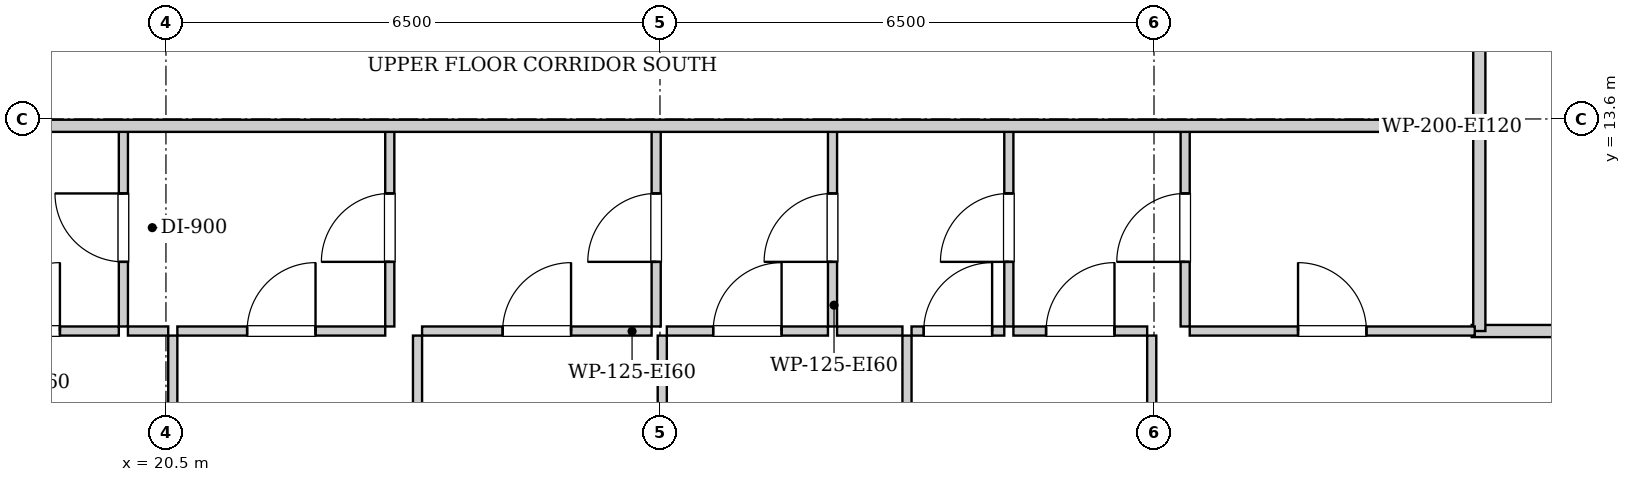
"""IFC4 building model, lengths in metres.
Left out: names, types, materials, properties, quantities, classifications, styles, units other than length and angle.
Written with IfcOpenShell. Run it as: python <this file> out.ifc"""

import sys

from ifc_helpers import new_model, si_unit, direction, frame, frame_2d, origin, place, context, subcontext, project, spatial, rectangle, extrude, element, fill, save


model = new_model("IFC4")
c1 = context("Model", 3, precision=1e-05, world=origin(), true_north=direction((0.0, 1.0)))
c2 = subcontext(c1, "Body", "Model", "MODEL_VIEW")
j1 = project(units=[si_unit("LENGTHUNIT", "METRE"), si_unit("PLANEANGLEUNIT", "RADIAN")], contexts=[c1])
p1 = place(None, origin())
s1 = spatial("IfcSite", under=j1, at=p1, CompositionType="ELEMENT")
p2 = place(p1, origin())
s2 = spatial("IfcBuilding", under=s1, at=p2, CompositionType="ELEMENT")
p3 = place(p2, frame((0.0, 0.0, 184.3)))
s3 = spatial("IfcBuildingStorey", under=s2, at=p3, CompositionType="ELEMENT", Elevation=184.3)
p4 = place(p3, frame((37.78, 13.51, 0.0), z_axis=(0.0, 0.0, 1.0), x_axis=(0.0, 1.0, 0.0)))
e1 = element("IfcWall", 1, at=p4, inside=s3, PredefinedType="PARTITIONING", context=c2, shape_type="SweptSolid", body=[
    extrude(rectangle(XDim=1.58, YDim=0.16, at=frame_2d((0.79, 0.0))), origin(), (0.0, 0.0, 1.0), 3.04),
])
p5 = place(p3, frame((37.68, 10.81, 0.0), z_axis=(0.0, 0.0, 1.0), x_axis=(1.0, 0.0, 0.0)))
e2 = element("IfcWall", 2, at=p5, inside=s3, PredefinedType="PARTITIONING", context=c2, shape_type="SweptSolid", body=[
    extrude(rectangle(XDim=2.34, YDim=0.16, at=frame_2d((1.17, 0.0))), origin(), (0.0, 0.0, 1.0), 3.04),
])
p6 = place(p3, frame((37.78, 10.81, 0.0), z_axis=(0.0, 0.0, 1.0), x_axis=(0.0, 1.0, 0.0)))
e3 = element("IfcWall", 3, at=p6, inside=s3, PredefinedType="PARTITIONING", context=c2, shape_type="SweptSolid", body=[
    extrude(rectangle(XDim=2.66, YDim=0.16, at=frame_2d((1.33, 0.0))), origin(), (0.0, 0.0, 1.0), 3.04),
])
p7 = place(p3, frame((19.94, 10.87, 0.0), z_axis=(0.0, 0.0, 1.0), x_axis=(0.0, 1.0, 0.0)))
e4 = element("IfcWall", 4, at=p7, inside=s3, PredefinedType="PARTITIONING", context=c2, shape_type="SweptSolid", body=[
    extrude(rectangle(XDim=2.6, YDim=0.12, at=frame_2d((1.3, 0.0))), origin(), (0.0, 0.0, 1.0), 3.04),
])
p8 = place(p7, frame((0.85, 0.0, 0.0)))
e5 = element("IfcOpeningElement", 5, at=p8, cuts=e4, PredefinedType="OPENING", context=c2, shape_type="SweptSolid", body=[
    extrude(rectangle(XDim=0.9, YDim=2.05, at=frame_2d((0.45, 1.025))), frame((0.0, 0.07, 0.0), z_axis=(0.0, -1.0, 0.0), x_axis=(1.0, 0.0, 0.0)), (0.0, 0.0, 1.0), 0.14),
])
p9 = place(p3, frame((17.43, 10.81, 0.0), z_axis=(0.0, 0.0, 1.0), x_axis=(1.0, 0.0, 0.0)))
e6 = element("IfcWall", 6, at=p9, inside=s3, PredefinedType="PARTITIONING", context=c2, shape_type="SweptSolid", body=[
    extrude(rectangle(XDim=2.45, YDim=0.12, at=frame_2d((1.225, 0.0))), origin(), (0.0, 0.0, 1.0), 3.04),
])
p10 = place(p9, frame((0.775, 0.0, 0.0)))
e7 = element("IfcOpeningElement", 7, at=p10, cuts=e6, PredefinedType="OPENING", context=c2, shape_type="SweptSolid", body=[
    extrude(rectangle(XDim=0.9, YDim=2.05, at=frame_2d((0.45, 1.025))), frame((0.0, 0.07, 0.0), z_axis=(0.0, -1.0, 0.0), x_axis=(1.0, 0.0, 0.0)), (0.0, 0.0, 1.0), 0.14),
])
p11 = place(p3, frame((23.445, 10.87, 0.0), z_axis=(0.0, 0.0, 1.0), x_axis=(0.0, 1.0, 0.0)))
e8 = element("IfcWall", 8, at=p11, inside=s3, PredefinedType="PARTITIONING", context=c2, shape_type="SweptSolid", body=[
    extrude(rectangle(XDim=2.6, YDim=0.12, at=frame_2d((1.3, 0.0))), origin(), (0.0, 0.0, 1.0), 3.04),
])
p12 = place(p11, frame((0.85, 0.0, 0.0)))
e9 = element("IfcOpeningElement", 9, at=p12, cuts=e8, PredefinedType="OPENING", context=c2, shape_type="SweptSolid", body=[
    extrude(rectangle(XDim=0.9, YDim=2.05, at=frame_2d((0.45, 1.025))), frame((0.0, 0.07, 0.0), z_axis=(0.0, -1.0, 0.0), x_axis=(1.0, 0.0, 0.0)), (0.0, 0.0, 1.0), 0.14),
])
p13 = place(p3, frame((20.0, 10.81, 0.0), z_axis=(0.0, 0.0, 1.0), x_axis=(1.0, 0.0, 0.0)))
e10 = element("IfcWall", 10, at=p13, inside=s3, PredefinedType="PARTITIONING", context=c2, shape_type="SweptSolid", body=[
    extrude(rectangle(XDim=0.53, YDim=0.12, at=frame_2d((0.265, 0.0))), origin(), (0.0, 0.0, 1.0), 3.04),
])
p14 = place(p3, frame((20.65, 10.81, 0.0), z_axis=(0.0, 0.0, 1.0), x_axis=(1.0, 0.0, 0.0)))
e11 = element("IfcWall", 11, at=p14, inside=s3, PredefinedType="PARTITIONING", context=c2, shape_type="SweptSolid", body=[
    extrude(rectangle(XDim=2.735, YDim=0.12, at=frame_2d((1.368, 0.0))), origin(), (0.0, 0.0, 1.0), 3.04),
])
p15 = place(p14, frame((0.918, 0.0, 0.0)))
e12 = element("IfcOpeningElement", 12, at=p15, cuts=e11, PredefinedType="OPENING", context=c2, shape_type="SweptSolid", body=[
    extrude(rectangle(XDim=0.9, YDim=2.05, at=frame_2d((0.45, 1.025))), frame((0.0, 0.07, 0.0), z_axis=(0.0, -1.0, 0.0), x_axis=(1.0, 0.0, 0.0)), (0.0, 0.0, 1.0), 0.14),
])
p16 = place(p3, frame((26.95, 10.87, 0.0), z_axis=(0.0, 0.0, 1.0), x_axis=(0.0, 1.0, 0.0)))
e13 = element("IfcWall", 13, at=p16, inside=s3, PredefinedType="PARTITIONING", context=c2, shape_type="SweptSolid", body=[
    extrude(rectangle(XDim=2.6, YDim=0.12, at=frame_2d((1.3, 0.0))), origin(), (0.0, 0.0, 1.0), 3.04),
])
p17 = place(p16, frame((0.85, 0.0, 0.0)))
e14 = element("IfcOpeningElement", 14, at=p17, cuts=e13, PredefinedType="OPENING", context=c2, shape_type="SweptSolid", body=[
    extrude(rectangle(XDim=0.9, YDim=2.05, at=frame_2d((0.45, 1.025))), frame((0.0, 0.07, 0.0), z_axis=(0.0, -1.0, 0.0), x_axis=(1.0, 0.0, 0.0)), (0.0, 0.0, 1.0), 0.14),
])
p18 = place(p3, frame((23.87, 10.81, 0.0), z_axis=(0.0, 0.0, 1.0), x_axis=(1.0, 0.0, 0.0)))
e15 = element("IfcWall", 15, at=p18, inside=s3, PredefinedType="PARTITIONING", context=c2, shape_type="SweptSolid", body=[
    extrude(rectangle(XDim=3.02, YDim=0.12, at=frame_2d((1.51, 0.0))), origin(), (0.0, 0.0, 1.0), 3.04),
])
p19 = place(p18, frame((1.06, 0.0, 0.0)))
e16 = element("IfcOpeningElement", 16, at=p19, cuts=e15, PredefinedType="OPENING", context=c2, shape_type="SweptSolid", body=[
    extrude(rectangle(XDim=0.9, YDim=2.05, at=frame_2d((0.45, 1.025))), frame((0.0, 0.07, 0.0), z_axis=(0.0, -1.0, 0.0), x_axis=(1.0, 0.0, 0.0)), (0.0, 0.0, 1.0), 0.14),
])
p20 = place(p3, frame((29.27, 10.87, 0.0), z_axis=(0.0, 0.0, 1.0), x_axis=(0.0, 1.0, 0.0)))
e17 = element("IfcWall", 17, at=p20, inside=s3, PredefinedType="PARTITIONING", context=c2, shape_type="SweptSolid", body=[
    extrude(rectangle(XDim=2.6, YDim=0.12, at=frame_2d((1.3, 0.0))), origin(), (0.0, 0.0, 1.0), 3.04),
])
p21 = place(p20, frame((0.85, 0.0, 0.0)))
e18 = element("IfcOpeningElement", 18, at=p21, cuts=e17, PredefinedType="OPENING", context=c2, shape_type="SweptSolid", body=[
    extrude(rectangle(XDim=0.9, YDim=2.05, at=frame_2d((0.45, 1.025))), frame((0.0, 0.07, 0.0), z_axis=(0.0, -1.0, 0.0), x_axis=(1.0, 0.0, 0.0)), (0.0, 0.0, 1.0), 0.14),
])
p22 = place(p3, frame((27.09, 10.81, 0.0), z_axis=(0.0, 0.0, 1.0), x_axis=(1.0, 0.0, 0.0)))
e19 = element("IfcWall", 19, at=p22, inside=s3, PredefinedType="PARTITIONING", context=c2, shape_type="SweptSolid", body=[
    extrude(rectangle(XDim=2.12, YDim=0.12, at=frame_2d((1.06, 0.0))), origin(), (0.0, 0.0, 1.0), 3.04),
])
p23 = place(p22, frame((0.61, 0.0, 0.0)))
e20 = element("IfcOpeningElement", 20, at=p23, cuts=e19, PredefinedType="OPENING", context=c2, shape_type="SweptSolid", body=[
    extrude(rectangle(XDim=0.9, YDim=2.05, at=frame_2d((0.45, 1.025))), frame((0.0, 0.07, 0.0), z_axis=(0.0, -1.0, 0.0), x_axis=(1.0, 0.0, 0.0)), (0.0, 0.0, 1.0), 0.14),
])
p24 = place(p3, frame((31.59, 10.87, 0.0), z_axis=(0.0, 0.0, 1.0), x_axis=(0.0, 1.0, 0.0)))
e21 = element("IfcWall", 21, at=p24, inside=s3, PredefinedType="PARTITIONING", context=c2, shape_type="SweptSolid", body=[
    extrude(rectangle(XDim=2.6, YDim=0.12, at=frame_2d((1.3, 0.0))), origin(), (0.0, 0.0, 1.0), 3.04),
])
p25 = place(p24, frame((0.85, 0.0, 0.0)))
e22 = element("IfcOpeningElement", 22, at=p25, cuts=e21, PredefinedType="OPENING", context=c2, shape_type="SweptSolid", body=[
    extrude(rectangle(XDim=0.9, YDim=2.05, at=frame_2d((0.45, 1.025))), frame((0.0, 0.07, 0.0), z_axis=(0.0, -1.0, 0.0), x_axis=(1.0, 0.0, 0.0)), (0.0, 0.0, 1.0), 0.14),
])
p26 = place(p3, frame((29.33, 10.81, 0.0), z_axis=(0.0, 0.0, 1.0), x_axis=(1.0, 0.0, 0.0)))
e23 = element("IfcWall", 23, at=p26, inside=s3, PredefinedType="PARTITIONING", context=c2, shape_type="SweptSolid", body=[
    extrude(rectangle(XDim=0.86, YDim=0.12, at=frame_2d((0.43, 0.0))), origin(), (0.0, 0.0, 1.0), 3.04),
])
p27 = place(p3, frame((30.31, 10.81, 0.0), z_axis=(0.0, 0.0, 1.0), x_axis=(1.0, 0.0, 0.0)))
e24 = element("IfcWall", 24, at=p27, inside=s3, PredefinedType="PARTITIONING", context=c2, shape_type="SweptSolid", body=[
    extrude(rectangle(XDim=1.22, YDim=0.12, at=frame_2d((0.61, 0.0))), origin(), (0.0, 0.0, 1.0), 3.04),
])
p28 = place(p27, frame((0.16, 0.0, 0.0)))
e25 = element("IfcOpeningElement", 25, at=p28, cuts=e24, PredefinedType="OPENING", context=c2, shape_type="SweptSolid", body=[
    extrude(rectangle(XDim=0.9, YDim=2.05, at=frame_2d((0.45, 1.025))), frame((0.0, 0.07, 0.0), z_axis=(0.0, -1.0, 0.0), x_axis=(1.0, 0.0, 0.0)), (0.0, 0.0, 1.0), 0.14),
])
p29 = place(p3, frame((33.91, 10.87, 0.0), z_axis=(0.0, 0.0, 1.0), x_axis=(0.0, 1.0, 0.0)))
e26 = element("IfcWall", 26, at=p29, inside=s3, PredefinedType="PARTITIONING", context=c2, shape_type="SweptSolid", body=[
    extrude(rectangle(XDim=2.6, YDim=0.12, at=frame_2d((1.3, 0.0))), origin(), (0.0, 0.0, 1.0), 3.04),
])
p30 = place(p29, frame((0.85, 0.0, 0.0)))
e27 = element("IfcOpeningElement", 27, at=p30, cuts=e26, PredefinedType="OPENING", context=c2, shape_type="SweptSolid", body=[
    extrude(rectangle(XDim=0.9, YDim=2.05, at=frame_2d((0.45, 1.025))), frame((0.0, 0.07, 0.0), z_axis=(0.0, -1.0, 0.0), x_axis=(1.0, 0.0, 0.0)), (0.0, 0.0, 1.0), 0.14),
])
p31 = place(p3, frame((31.65, 10.81, 0.0), z_axis=(0.0, 0.0, 1.0), x_axis=(1.0, 0.0, 0.0)))
e28 = element("IfcWall", 28, at=p31, inside=s3, PredefinedType="PARTITIONING", context=c2, shape_type="SweptSolid", body=[
    extrude(rectangle(XDim=1.76, YDim=0.12, at=frame_2d((0.88, 0.0))), origin(), (0.0, 0.0, 1.0), 3.04),
])
p32 = place(p31, frame((0.43, 0.0, 0.0)))
e29 = element("IfcOpeningElement", 29, at=p32, cuts=e28, PredefinedType="OPENING", context=c2, shape_type="SweptSolid", body=[
    extrude(rectangle(XDim=0.9, YDim=2.05, at=frame_2d((0.45, 1.025))), frame((0.0, 0.07, 0.0), z_axis=(0.0, -1.0, 0.0), x_axis=(1.0, 0.0, 0.0)), (0.0, 0.0, 1.0), 0.14),
])
p33 = place(p3, frame((33.97, 10.81, 0.0), z_axis=(0.0, 0.0, 1.0), x_axis=(1.0, 0.0, 0.0)))
e30 = element("IfcWall", 30, at=p33, inside=s3, PredefinedType="PARTITIONING", context=c2, shape_type="SweptSolid", body=[
    extrude(rectangle(XDim=3.75, YDim=0.12, at=frame_2d((1.875, 0.0))), origin(), (0.0, 0.0, 1.0), 3.04),
])
p34 = place(p33, frame((1.425, 0.0, 0.0)))
e31 = element("IfcOpeningElement", 31, at=p34, cuts=e30, PredefinedType="OPENING", context=c2, shape_type="SweptSolid", body=[
    extrude(rectangle(XDim=0.9, YDim=2.05, at=frame_2d((0.45, 1.025))), frame((0.0, 0.07, 0.0), z_axis=(0.0, -1.0, 0.0), x_axis=(1.0, 0.0, 0.0)), (0.0, 0.0, 1.0), 0.14),
])
p35 = place(p3, frame((20.59, 4.08, 0.0), z_axis=(0.0, 0.0, 1.0), x_axis=(0.0, 1.0, 0.0)))
e32 = element("IfcWall", 32, at=p35, inside=s3, PredefinedType="PARTITIONING", context=c2, shape_type="SweptSolid", body=[
    extrude(rectangle(XDim=6.67, YDim=0.12, at=frame_2d((3.335, 0.0))), origin(), (0.0, 0.0, 1.0), 3.04),
])
p36 = place(p35, frame((2.87, 0.0, 0.0)))
e33 = element("IfcOpeningElement", 33, at=p36, cuts=e32, PredefinedType="OPENING", context=c2, shape_type="SweptSolid", body=[
    extrude(rectangle(XDim=0.9, YDim=2.05, at=frame_2d((0.45, 1.025))), frame((0.0, 0.07, 0.0), z_axis=(0.0, -1.0, 0.0), x_axis=(1.0, 0.0, 0.0)), (0.0, 0.0, 1.0), 0.14),
])
p37 = place(p3, frame((23.81, 4.08, 0.0), z_axis=(0.0, 0.0, 1.0), x_axis=(0.0, 1.0, 0.0)))
e34 = element("IfcWall", 34, at=p37, inside=s3, PredefinedType="PARTITIONING", context=c2, shape_type="SweptSolid", body=[
    extrude(rectangle(XDim=6.67, YDim=0.12, at=frame_2d((3.335, 0.0))), origin(), (0.0, 0.0, 1.0), 3.04),
])
p38 = place(p37, frame((2.87, 0.0, 0.0)))
e35 = element("IfcOpeningElement", 35, at=p38, cuts=e34, PredefinedType="OPENING", context=c2, shape_type="SweptSolid", body=[
    extrude(rectangle(XDim=0.9, YDim=2.05, at=frame_2d((0.45, 1.025))), frame((0.0, 0.07, 0.0), z_axis=(0.0, -1.0, 0.0), x_axis=(1.0, 0.0, 0.0)), (0.0, 0.0, 1.0), 0.14),
])
p39 = place(p3, frame((27.03, 4.08, 0.0), z_axis=(0.0, 0.0, 1.0), x_axis=(0.0, 1.0, 0.0)))
e36 = element("IfcWall", 36, at=p39, inside=s3, PredefinedType="PARTITIONING", context=c2, shape_type="SweptSolid", body=[
    extrude(rectangle(XDim=6.67, YDim=0.12, at=frame_2d((3.335, 0.0))), origin(), (0.0, 0.0, 1.0), 3.04),
])
p40 = place(p39, frame((2.87, 0.0, 0.0)))
e37 = element("IfcOpeningElement", 37, at=p40, cuts=e36, PredefinedType="OPENING", context=c2, shape_type="SweptSolid", body=[
    extrude(rectangle(XDim=0.9, YDim=2.05, at=frame_2d((0.45, 1.025))), frame((0.0, 0.07, 0.0), z_axis=(0.0, -1.0, 0.0), x_axis=(1.0, 0.0, 0.0)), (0.0, 0.0, 1.0), 0.14),
])
p41 = place(p3, frame((30.25, 4.08, 0.0), z_axis=(0.0, 0.0, 1.0), x_axis=(0.0, 1.0, 0.0)))
e38 = element("IfcWall", 38, at=p41, inside=s3, PredefinedType="PARTITIONING", context=c2, shape_type="SweptSolid", body=[
    extrude(rectangle(XDim=6.67, YDim=0.12, at=frame_2d((3.335, 0.0))), origin(), (0.0, 0.0, 1.0), 3.04),
])
p42 = place(p41, frame((2.87, 0.0, 0.0)))
e39 = element("IfcOpeningElement", 39, at=p42, cuts=e38, PredefinedType="OPENING", context=c2, shape_type="SweptSolid", body=[
    extrude(rectangle(XDim=0.9, YDim=2.05, at=frame_2d((0.45, 1.025))), frame((0.0, 0.07, 0.0), z_axis=(0.0, -1.0, 0.0), x_axis=(1.0, 0.0, 0.0)), (0.0, 0.0, 1.0), 0.14),
])
p43 = place(p3, frame((33.47, 6.23, 0.0), z_axis=(0.0, 0.0, 1.0), x_axis=(0.0, 1.0, 0.0)))
e40 = element("IfcWall", 40, at=p43, inside=s3, PredefinedType="PARTITIONING", context=c2, shape_type="SweptSolid", body=[
    extrude(rectangle(XDim=4.52, YDim=0.12, at=frame_2d((2.26, 0.0))), origin(), (0.0, 0.0, 1.0), 3.04),
])
p44 = place(p43, frame((1.81, 0.0, 0.0)))
e41 = element("IfcOpeningElement", 41, at=p44, cuts=e40, PredefinedType="OPENING", context=c2, shape_type="SweptSolid", body=[
    extrude(rectangle(XDim=0.9, YDim=2.05, at=frame_2d((0.45, 1.025))), frame((0.0, 0.07, 0.0), z_axis=(0.0, -1.0, 0.0), x_axis=(1.0, 0.0, 0.0)), (0.0, 0.0, 1.0), 0.14),
])
p45 = place(p3, frame((13.15, 13.51, 0.0), z_axis=(0.0, 0.0, 1.0), x_axis=(1.0, 0.0, 0.0)))
e42 = element("IfcWall", 42, at=p45, inside=s3, PredefinedType="PARTITIONING", context=c2, shape_type="SweptSolid", body=[
    extrude(rectangle(XDim=24.6, YDim=0.16, at=frame_2d((12.3, 0.0))), origin(), (0.0, 0.0, 1.0), 3.04),
])
p46 = place(p45, frame((3.115, 0.0, 0.0)))
e43 = element("IfcOpeningElement", 43, at=p46, cuts=e42, PredefinedType="OPENING", context=c2, shape_type="SweptSolid", body=[
    extrude(rectangle(XDim=0.95, YDim=2.1, at=frame_2d((0.475, 1.05))), frame((0.0, 0.09, 0.0), z_axis=(0.0, -1.0, 0.0), x_axis=(1.0, 0.0, 0.0)), (0.0, 0.0, 1.0), 0.18),
])
p47 = place(p8, origin())
e44 = element("IfcDoor", 44, at=p47, inside=s3, OperationType="SINGLE_SWING_RIGHT", PredefinedType="DOOR", context=c2, shape_type="SweptSolid", body=[
    extrude(rectangle(XDim=0.9, YDim=2.05, at=frame_2d((0.45, 1.025))), frame((0.0, 0.025, 0.0), z_axis=(0.0, -1.0, 0.0), x_axis=(1.0, 0.0, 0.0)), (0.0, 0.0, 1.0), 0.05),
])
fill(e5, e44)
p48 = place(p10, origin())
e45 = element("IfcDoor", 45, at=p48, inside=s3, OperationType="SINGLE_SWING_RIGHT", PredefinedType="DOOR", context=c2, shape_type="SweptSolid", body=[
    extrude(rectangle(XDim=0.9, YDim=2.05, at=frame_2d((0.45, 1.025))), frame((0.0, 0.025, 0.0), z_axis=(0.0, -1.0, 0.0), x_axis=(1.0, 0.0, 0.0)), (0.0, 0.0, 1.0), 0.05),
])
fill(e7, e45)
p49 = place(p12, origin())
e46 = element("IfcDoor", 46, at=p49, inside=s3, OperationType="SINGLE_SWING_LEFT", PredefinedType="DOOR", context=c2, shape_type="SweptSolid", body=[
    extrude(rectangle(XDim=0.9, YDim=2.05, at=frame_2d((0.45, 1.025))), frame((0.0, 0.025, 0.0), z_axis=(0.0, -1.0, 0.0), x_axis=(1.0, 0.0, 0.0)), (0.0, 0.0, 1.0), 0.05),
])
fill(e9, e46)
p50 = place(p15, origin())
e47 = element("IfcDoor", 47, at=p50, inside=s3, OperationType="SINGLE_SWING_RIGHT", PredefinedType="DOOR", context=c2, shape_type="SweptSolid", body=[
    extrude(rectangle(XDim=0.9, YDim=2.05, at=frame_2d((0.45, 1.025))), frame((0.0, 0.025, 0.0), z_axis=(0.0, -1.0, 0.0), x_axis=(1.0, 0.0, 0.0)), (0.0, 0.0, 1.0), 0.05),
])
fill(e12, e47)
p51 = place(p17, origin())
e48 = element("IfcDoor", 48, at=p51, inside=s3, OperationType="SINGLE_SWING_LEFT", PredefinedType="DOOR", context=c2, shape_type="SweptSolid", body=[
    extrude(rectangle(XDim=0.9, YDim=2.05, at=frame_2d((0.45, 1.025))), frame((0.0, 0.025, 0.0), z_axis=(0.0, -1.0, 0.0), x_axis=(1.0, 0.0, 0.0)), (0.0, 0.0, 1.0), 0.05),
])
fill(e14, e48)
p52 = place(p19, origin())
e49 = element("IfcDoor", 49, at=p52, inside=s3, OperationType="SINGLE_SWING_RIGHT", PredefinedType="DOOR", context=c2, shape_type="SweptSolid", body=[
    extrude(rectangle(XDim=0.9, YDim=2.05, at=frame_2d((0.45, 1.025))), frame((0.0, 0.025, 0.0), z_axis=(0.0, -1.0, 0.0), x_axis=(1.0, 0.0, 0.0)), (0.0, 0.0, 1.0), 0.05),
])
fill(e16, e49)
p53 = place(p21, origin())
e50 = element("IfcDoor", 50, at=p53, inside=s3, OperationType="SINGLE_SWING_LEFT", PredefinedType="DOOR", context=c2, shape_type="SweptSolid", body=[
    extrude(rectangle(XDim=0.9, YDim=2.05, at=frame_2d((0.45, 1.025))), frame((0.0, 0.025, 0.0), z_axis=(0.0, -1.0, 0.0), x_axis=(1.0, 0.0, 0.0)), (0.0, 0.0, 1.0), 0.05),
])
fill(e18, e50)
p54 = place(p23, origin())
e51 = element("IfcDoor", 51, at=p54, inside=s3, OperationType="SINGLE_SWING_RIGHT", PredefinedType="DOOR", context=c2, shape_type="SweptSolid", body=[
    extrude(rectangle(XDim=0.9, YDim=2.05, at=frame_2d((0.45, 1.025))), frame((0.0, 0.025, 0.0), z_axis=(0.0, -1.0, 0.0), x_axis=(1.0, 0.0, 0.0)), (0.0, 0.0, 1.0), 0.05),
])
fill(e20, e51)
p55 = place(p25, origin())
e52 = element("IfcDoor", 52, at=p55, inside=s3, OperationType="SINGLE_SWING_LEFT", PredefinedType="DOOR", context=c2, shape_type="SweptSolid", body=[
    extrude(rectangle(XDim=0.9, YDim=2.05, at=frame_2d((0.45, 1.025))), frame((0.0, 0.025, 0.0), z_axis=(0.0, -1.0, 0.0), x_axis=(1.0, 0.0, 0.0)), (0.0, 0.0, 1.0), 0.05),
])
fill(e22, e52)
p56 = place(p28, origin())
e53 = element("IfcDoor", 53, at=p56, inside=s3, OperationType="SINGLE_SWING_RIGHT", PredefinedType="DOOR", context=c2, shape_type="SweptSolid", body=[
    extrude(rectangle(XDim=0.9, YDim=2.05, at=frame_2d((0.45, 1.025))), frame((0.0, 0.025, 0.0), z_axis=(0.0, -1.0, 0.0), x_axis=(1.0, 0.0, 0.0)), (0.0, 0.0, 1.0), 0.05),
])
fill(e25, e53)
p57 = place(p30, origin())
e54 = element("IfcDoor", 54, at=p57, inside=s3, OperationType="SINGLE_SWING_LEFT", PredefinedType="DOOR", context=c2, shape_type="SweptSolid", body=[
    extrude(rectangle(XDim=0.9, YDim=2.05, at=frame_2d((0.45, 1.025))), frame((0.0, 0.025, 0.0), z_axis=(0.0, -1.0, 0.0), x_axis=(1.0, 0.0, 0.0)), (0.0, 0.0, 1.0), 0.05),
])
fill(e27, e54)
p58 = place(p32, origin())
e55 = element("IfcDoor", 55, at=p58, inside=s3, OperationType="SINGLE_SWING_RIGHT", PredefinedType="DOOR", context=c2, shape_type="SweptSolid", body=[
    extrude(rectangle(XDim=0.9, YDim=2.05, at=frame_2d((0.45, 1.025))), frame((0.0, 0.025, 0.0), z_axis=(0.0, -1.0, 0.0), x_axis=(1.0, 0.0, 0.0)), (0.0, 0.0, 1.0), 0.05),
])
fill(e29, e55)
p59 = place(p34, origin())
e56 = element("IfcDoor", 56, at=p59, inside=s3, OperationType="SINGLE_SWING_LEFT", PredefinedType="DOOR", context=c2, shape_type="SweptSolid", body=[
    extrude(rectangle(XDim=0.9, YDim=2.05, at=frame_2d((0.45, 1.025))), frame((0.0, 0.025, 0.0), z_axis=(0.0, -1.0, 0.0), x_axis=(1.0, 0.0, 0.0)), (0.0, 0.0, 1.0), 0.05),
])
fill(e31, e56)
save(model, sys.argv[1])
